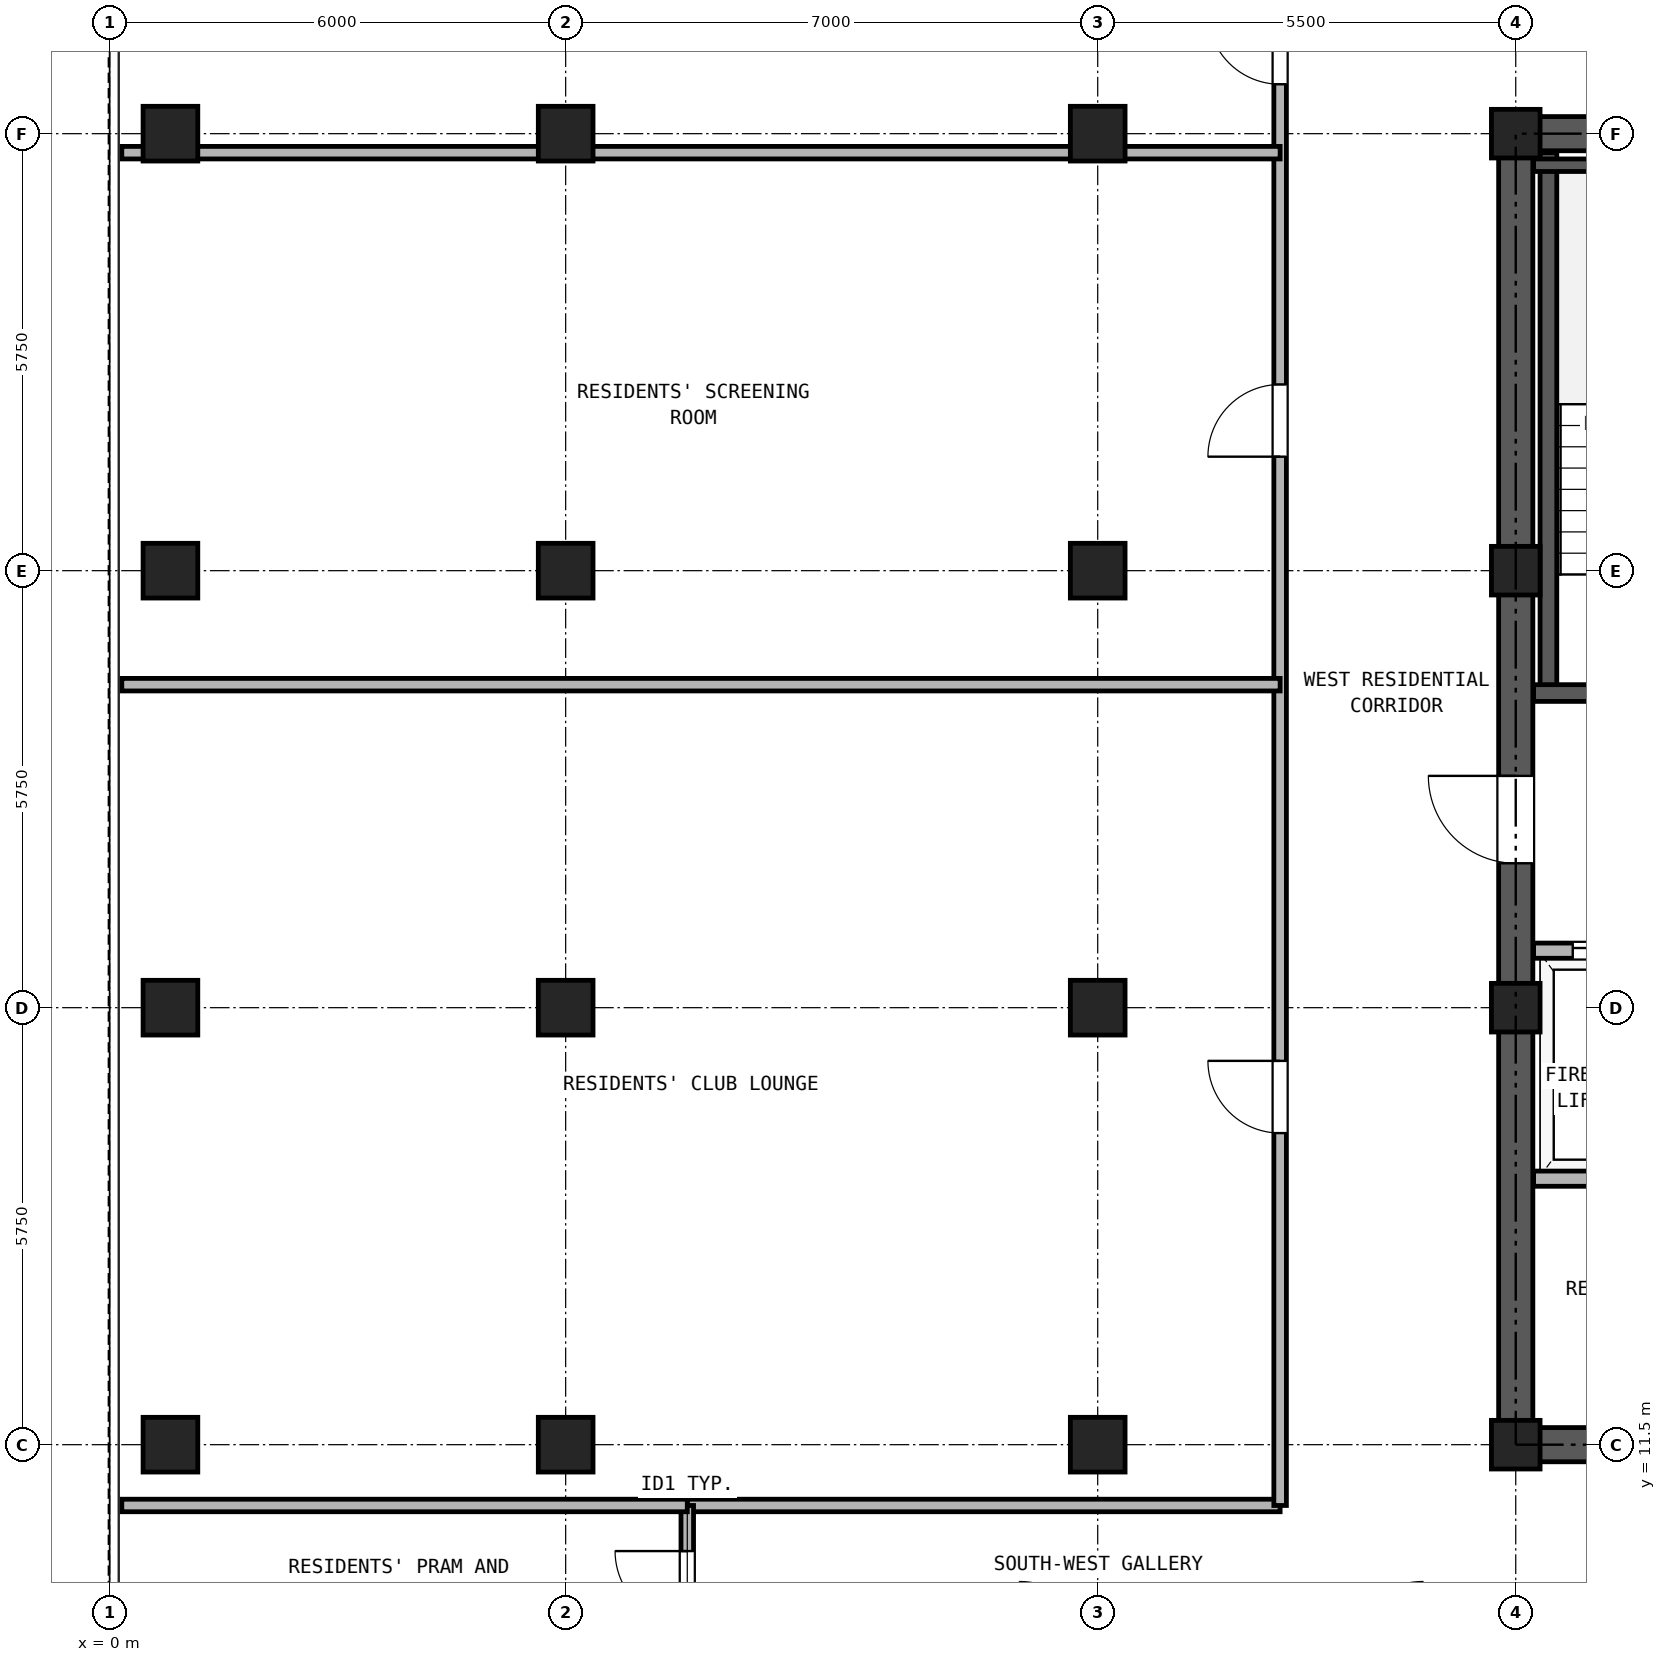
"""IFC4 building model, lengths in metres.
Left out: names, types, materials, properties, quantities, classifications, styles, units other than length and angle.
Written with IfcOpenShell. Run it as: python <this file> out.ifc"""

import sys

from ifc_helpers import new_model, si_unit, direction, frame, frame_2d, origin, origin_2d, place, context, subcontext, project, spatial, rectangle, hollow_rectangle, extrude, source, transform, mapped, element, fill, save


model = new_model("IFC4")
c1 = context("Model", 3, precision=1e-05, world=origin(), true_north=direction((0.0, 1.0)))
c2 = subcontext(c1, "Body", "Model", "MODEL_VIEW")
j1 = project(units=[si_unit("LENGTHUNIT", "METRE"), si_unit("PLANEANGLEUNIT", "RADIAN")], contexts=[c1])
p1 = place(None, origin())
s1 = spatial("IfcSite", under=j1, at=p1, CompositionType="ELEMENT")
p2 = place(p1, origin())
s2 = spatial("IfcBuilding", under=s1, at=p2, CompositionType="ELEMENT")
p3 = place(p2, frame((0.0, 0.0, 175.3)))
s3 = spatial("IfcBuildingStorey", under=s2, at=p3, CompositionType="ELEMENT", Elevation=175.3)
m1 = source(origin(), c2, "Body", "SweptSolid", [
    extrude(hollow_rectangle(XDim=0.72, YDim=0.72, WallThickness=0.04, at=origin_2d()), origin(), (0.0, 0.0, 1.0), 2.95),
])
for number, where, z_axis, x_axis in (
    (1, (0.8, 11.5, 0.0), (0.0, 0.0, 1.0), (1.0, 0.0, 0.0)),
    (2, (0.8, 17.25, 0.0), (0.0, 0.0, 1.0), (1.0, 0.0, 0.0)),
    (3, (0.8, 23.0, 0.0), (0.0, 0.0, 1.0), (1.0, 0.0, 0.0)),
    (4, (0.8, 28.75, 0.0), (0.0, 0.0, 1.0), (1.0, 0.0, 0.0)),
    (5, (6.0, 11.5, 0.0), (0.0, 0.0, 1.0), (1.0, 0.0, 0.0)),
    (6, (6.0, 17.25, 0.0), (0.0, 0.0, 1.0), (1.0, 0.0, 0.0)),
    (7, (6.0, 23.0, 0.0), (0.0, 0.0, 1.0), (1.0, 0.0, 0.0)),
    (8, (6.0, 28.75, 0.0), (0.0, 0.0, 1.0), (1.0, 0.0, 0.0)),
    (9, (13.0, 11.5, 0.0), (0.0, 0.0, 1.0), (1.0, 0.0, 0.0)),
    (10, (13.0, 17.25, 0.0), (0.0, 0.0, 1.0), (1.0, 0.0, 0.0)),
    (11, (13.0, 23.0, 0.0), (0.0, 0.0, 1.0), (1.0, 0.0, 0.0)),
    (12, (13.0, 28.75, 0.0), (0.0, 0.0, 1.0), (1.0, 0.0, 0.0)),
):
    element("IfcColumn", number, at=place(p3, frame(where, z_axis=z_axis, x_axis=x_axis)), inside=s3, PredefinedType="COLUMN", context=c2, shape_type="MappedRepresentation", body=[
        mapped(m1, transform((0.0, 0.0, 0.0), x_axis=(1.0, 0.0, 0.0), y_axis=(0.0, 1.0, 0.0), z_axis=(0.0, 0.0, 1.0), scale=1.0)),
    ])
m2 = source(origin(), c2, "Body", "SweptSolid", [
    extrude(hollow_rectangle(XDim=0.64, YDim=0.64, WallThickness=0.035, at=origin_2d()), origin(), (0.0, 0.0, 1.0), 2.95),
])
for number, where, z_axis, x_axis in (
    (13, (18.5, 11.5, 0.0), (0.0, 0.0, 1.0), (1.0, 0.0, 0.0)),
    (14, (18.5, 17.25, 0.0), (0.0, 0.0, 1.0), (1.0, 0.0, 0.0)),
    (15, (18.5, 23.0, 0.0), (0.0, 0.0, 1.0), (1.0, 0.0, 0.0)),
    (16, (18.5, 28.75, 0.0), (0.0, 0.0, 1.0), (1.0, 0.0, 0.0)),
):
    element("IfcColumn", number, at=place(p3, frame(where, z_axis=z_axis, x_axis=x_axis)), inside=s3, PredefinedType="COLUMN", context=c2, shape_type="MappedRepresentation", body=[
        mapped(m2, transform((0.0, 0.0, 0.0), x_axis=(1.0, 0.0, 0.0), y_axis=(0.0, 1.0, 0.0), z_axis=(0.0, 0.0, 1.0), scale=1.0)),
    ])
p4 = place(p3, frame((18.275, 11.5, 0.0), z_axis=(0.0, 0.0, 1.0), x_axis=(1.0, 0.0, 0.0)))
e17 = element("IfcWall", 17, at=p4, inside=s3, PredefinedType="SHEAR", context=c2, shape_type="SweptSolid", body=[
    extrude(rectangle(XDim=10.45, YDim=0.45, at=frame_2d((5.225, 0.0))), origin(), (0.0, 0.0, 1.0), 2.95),
])
p5 = place(p4, frame((1.825, 0.0, 0.0)))
e18 = element("IfcOpeningElement", 18, at=p5, cuts=e17, PredefinedType="OPENING", context=c2, shape_type="SweptSolid", body=[
    extrude(rectangle(XDim=0.95, YDim=2.15, at=frame_2d((0.475, 1.075))), frame((0.0, 0.235, 0.0), z_axis=(0.0, -1.0, 0.0), x_axis=(1.0, 0.0, 0.0)), (0.0, 0.0, 1.0), 0.47),
])
p6 = place(p4, frame((5.325, 0.0, 0.0)))
e19 = element("IfcOpeningElement", 19, at=p6, cuts=e17, PredefinedType="OPENING", context=c2, shape_type="SweptSolid", body=[
    extrude(rectangle(XDim=0.95, YDim=2.15, at=frame_2d((0.475, 1.075))), frame((0.0, 0.235, 0.0), z_axis=(0.0, -1.0, 0.0), x_axis=(1.0, 0.0, 0.0)), (0.0, 0.0, 1.0), 0.47),
])
p7 = place(p4, frame((8.225, 0.0, 0.0)))
e20 = element("IfcOpeningElement", 20, at=p7, cuts=e17, PredefinedType="OPENING", context=c2, shape_type="SweptSolid", body=[
    extrude(rectangle(XDim=1.1, YDim=2.25, at=frame_2d((0.55, 1.125))), frame((0.0, 0.235, 0.0), z_axis=(0.0, -1.0, 0.0), x_axis=(1.0, 0.0, 0.0)), (0.0, 0.0, 1.0), 0.47),
])
p8 = place(p3, frame((18.275, 28.75, 0.0), z_axis=(0.0, 0.0, 1.0), x_axis=(1.0, 0.0, 0.0)))
e21 = element("IfcWall", 21, at=p8, inside=s3, PredefinedType="SHEAR", context=c2, shape_type="SweptSolid", body=[
    extrude(rectangle(XDim=10.45, YDim=0.45, at=frame_2d((5.225, 0.0))), origin(), (0.0, 0.0, 1.0), 2.95),
])
p9 = place(p8, frame((4.105, 0.0, 0.0)))
e22 = element("IfcOpeningElement", 22, at=p9, cuts=e21, PredefinedType="OPENING", context=c2, shape_type="SweptSolid", body=[
    extrude(rectangle(XDim=0.9, YDim=2.05, at=frame_2d((0.45, 1.025))), frame((0.0, 0.235, 0.0), z_axis=(0.0, -1.0, 0.0), x_axis=(1.0, 0.0, 0.0)), (0.0, 0.0, 1.0), 0.47),
])
p10 = place(p8, frame((5.645, 0.0, 0.0)))
e23 = element("IfcOpeningElement", 23, at=p10, cuts=e21, PredefinedType="OPENING", context=c2, shape_type="SweptSolid", body=[
    extrude(rectangle(XDim=0.9, YDim=2.05, at=frame_2d((0.45, 1.025))), frame((0.0, 0.235, 0.0), z_axis=(0.0, -1.0, 0.0), x_axis=(1.0, 0.0, 0.0)), (0.0, 0.0, 1.0), 0.47),
])
p11 = place(p3, frame((18.5, 11.725, 0.0), z_axis=(0.0, 0.0, 1.0), x_axis=(0.0, 1.0, 0.0)))
e24 = element("IfcWall", 24, at=p11, inside=s3, PredefinedType="SHEAR", context=c2, shape_type="SweptSolid", body=[
    extrude(rectangle(XDim=16.8, YDim=0.45, at=frame_2d((8.4, 0.0))), origin(), (0.0, 0.0, 1.0), 2.95),
])
p12 = place(p11, frame((7.425, 0.0, 0.0)))
e25 = element("IfcOpeningElement", 25, at=p12, cuts=e24, PredefinedType="OPENING", context=c2, shape_type="SweptSolid", body=[
    extrude(rectangle(XDim=1.15, YDim=2.2, at=frame_2d((0.575, 1.1))), frame((0.0, 0.235, 0.0), z_axis=(0.0, -1.0, 0.0), x_axis=(1.0, 0.0, 0.0)), (0.0, 0.0, 1.0), 0.47),
])
p13 = place(p3, frame((18.93, 21.39, 0.0), z_axis=(0.0, 0.0, 1.0), x_axis=(0.0, 1.0, 0.0)))
e26 = element("IfcWall", 26, at=p13, inside=s3, PredefinedType="SOLIDWALL", context=c2, shape_type="SweptSolid", body=[
    extrude(rectangle(XDim=7.11, YDim=0.22, at=frame_2d((3.555, 0.0))), origin(), (0.0, 0.0, 1.0), 2.95),
])
p14 = place(p3, frame((18.735, 28.335, 0.0), z_axis=(0.0, 0.0, 1.0), x_axis=(1.0, 0.0, 0.0)))
e27 = element("IfcWall", 27, at=p14, inside=s3, PredefinedType="PARTITIONING", context=c2, shape_type="SweptSolid", body=[
    extrude(rectangle(XDim=3.375, YDim=0.165, at=frame_2d((1.688, 0.0))), origin(), (0.0, 0.0, 1.0), 2.95),
])
p15 = place(p3, frame((18.735, 21.39, 0.0), z_axis=(0.0, 0.0, 1.0), x_axis=(1.0, 0.0, 0.0)))
e28 = element("IfcWall", 28, at=p15, inside=s3, PredefinedType="SOLIDWALL", context=c2, shape_type="SweptSolid", body=[
    extrude(rectangle(XDim=6.395, YDim=0.22, at=frame_2d((3.197, 0.0))), origin(), (0.0, 0.0, 1.0), 2.95),
])
p16 = place(p15, frame((1.115, 0.0, 0.0)))
e29 = element("IfcOpeningElement", 29, at=p16, cuts=e28, PredefinedType="OPENING", context=c2, shape_type="SweptSolid", body=[
    extrude(rectangle(XDim=1.15, YDim=2.2, at=frame_2d((0.575, 1.1))), frame((0.0, 0.12, 0.0), z_axis=(0.0, -1.0, 0.0), x_axis=(1.0, 0.0, 0.0)), (0.0, 0.0, 1.0), 0.24),
])
p17 = place(p15, frame((4.845, 0.0, 0.0)))
e30 = element("IfcOpeningElement", 30, at=p17, cuts=e28, PredefinedType="OPENING", context=c2, shape_type="SweptSolid", body=[
    extrude(rectangle(XDim=1.1, YDim=2.25, at=frame_2d((0.55, 1.125))), frame((0.0, 0.12, 0.0), z_axis=(0.0, -1.0, 0.0), x_axis=(1.0, 0.0, 0.0)), (0.0, 0.0, 1.0), 0.24),
])
p18 = place(p3, frame((18.735, 18.0, 0.0), z_axis=(0.0, 0.0, 1.0), x_axis=(1.0, 0.0, 0.0)))
e31 = element("IfcWall", 31, at=p18, inside=s3, PredefinedType="PARTITIONING", context=c2, shape_type="SweptSolid", body=[
    extrude(rectangle(XDim=9.53, YDim=0.2, at=frame_2d((4.765, 0.0))), origin(), (0.0, 0.0, 1.0), 2.95),
])
p19 = place(p18, frame((0.515, 0.0, 0.0)))
e32 = element("IfcOpeningElement", 32, at=p19, cuts=e31, PredefinedType="OPENING", context=c2, shape_type="SweptSolid", body=[
    extrude(rectangle(XDim=1.3, YDim=2.3, at=frame_2d((0.65, 1.15))), frame((0.0, 0.11, 0.0), z_axis=(0.0, -1.0, 0.0), x_axis=(1.0, 0.0, 0.0)), (0.0, 0.0, 1.0), 0.22),
])
p20 = place(p18, frame((2.615, 0.0, 0.0)))
e33 = element("IfcOpeningElement", 33, at=p20, cuts=e31, PredefinedType="OPENING", context=c2, shape_type="SweptSolid", body=[
    extrude(rectangle(XDim=1.3, YDim=2.3, at=frame_2d((0.65, 1.15))), frame((0.0, 0.11, 0.0), z_axis=(0.0, -1.0, 0.0), x_axis=(1.0, 0.0, 0.0)), (0.0, 0.0, 1.0), 0.22),
])
p21 = place(p18, frame((5.015, 0.0, 0.0)))
e34 = element("IfcOpeningElement", 34, at=p21, cuts=e31, PredefinedType="OPENING", context=c2, shape_type="SweptSolid", body=[
    extrude(rectangle(XDim=0.9, YDim=2.05, at=frame_2d((0.45, 1.025))), frame((0.0, 0.11, 0.0), z_axis=(0.0, -1.0, 0.0), x_axis=(1.0, 0.0, 0.0)), (0.0, 0.0, 1.0), 0.22),
])
p22 = place(p18, frame((7.715, 0.0, 0.0)))
e35 = element("IfcOpeningElement", 35, at=p22, cuts=e31, PredefinedType="OPENING", context=c2, shape_type="SweptSolid", body=[
    extrude(rectangle(XDim=0.9, YDim=2.05, at=frame_2d((0.45, 1.025))), frame((0.0, 0.11, 0.0), z_axis=(0.0, -1.0, 0.0), x_axis=(1.0, 0.0, 0.0)), (0.0, 0.0, 1.0), 0.22),
])
p23 = place(p3, frame((18.735, 15.0, 0.0), z_axis=(0.0, 0.0, 1.0), x_axis=(1.0, 0.0, 0.0)))
e36 = element("IfcWall", 36, at=p23, inside=s3, PredefinedType="PARTITIONING", context=c2, shape_type="SweptSolid", body=[
    extrude(rectangle(XDim=9.53, YDim=0.2, at=frame_2d((4.765, 0.0))), origin(), (0.0, 0.0, 1.0), 2.95),
])
p24 = place(p3, frame((7.6, 10.7, 0.0), z_axis=(0.0, 0.0, 1.0), x_axis=(1.0, 0.0, 0.0)))
e37 = element("IfcWall", 37, at=p24, inside=s3, PredefinedType="PARTITIONING", context=c2, shape_type="SweptSolid", body=[
    extrude(rectangle(XDim=7.8, YDim=0.165, at=frame_2d((3.9, 0.0))), origin(), (0.0, 0.0, 1.0), 2.95),
])
p25 = place(p3, frame((7.6, 8.7, 0.0), z_axis=(0.0, 0.0, 1.0), x_axis=(0.0, 1.0, 0.0)))
e38 = element("IfcWall", 38, at=p25, inside=s3, PredefinedType="PARTITIONING", context=c2, shape_type="SweptSolid", body=[
    extrude(rectangle(XDim=2.0, YDim=0.165, at=frame_2d((1.0, 0.0))), origin(), (0.0, 0.0, 1.0), 2.95),
])
p26 = place(p25, frame((0.45, 0.0, 0.0)))
e39 = element("IfcOpeningElement", 39, at=p26, cuts=e38, PredefinedType="OPENING", context=c2, shape_type="SweptSolid", body=[
    extrude(rectangle(XDim=0.95, YDim=2.15, at=frame_2d((0.475, 1.075))), frame((0.0, 0.093, 0.0), z_axis=(0.0, -1.0, 0.0), x_axis=(1.0, 0.0, 0.0)), (0.0, 0.0, 1.0), 0.185),
])
p27 = place(p3, frame((15.4, 10.7, 0.0), z_axis=(0.0, 0.0, 1.0), x_axis=(0.0, 1.0, 0.0)))
e40 = element("IfcWall", 40, at=p27, inside=s3, PredefinedType="PARTITIONING", context=c2, shape_type="SweptSolid", body=[
    extrude(rectangle(XDim=24.44, YDim=0.165, at=frame_2d((12.22, 0.0))), origin(), (0.0, 0.0, 1.0), 2.95),
])
p28 = place(p27, frame((4.9, 0.0, 0.0)))
e41 = element("IfcOpeningElement", 41, at=p28, cuts=e40, PredefinedType="OPENING", context=c2, shape_type="SweptSolid", body=[
    extrude(rectangle(XDim=0.95, YDim=2.15, at=frame_2d((0.475, 1.075))), frame((0.0, 0.093, 0.0), z_axis=(0.0, -1.0, 0.0), x_axis=(1.0, 0.0, 0.0)), (0.0, 0.0, 1.0), 0.185),
])
p29 = place(p27, frame((13.8, 0.0, 0.0)))
e42 = element("IfcOpeningElement", 42, at=p29, cuts=e40, PredefinedType="OPENING", context=c2, shape_type="SweptSolid", body=[
    extrude(rectangle(XDim=0.95, YDim=2.15, at=frame_2d((0.475, 1.075))), frame((0.0, 0.093, 0.0), z_axis=(0.0, -1.0, 0.0), x_axis=(1.0, 0.0, 0.0)), (0.0, 0.0, 1.0), 0.185),
])
p30 = place(p27, frame((18.7, 0.0, 0.0)))
e43 = element("IfcOpeningElement", 43, at=p30, cuts=e40, PredefinedType="OPENING", context=c2, shape_type="SweptSolid", body=[
    extrude(rectangle(XDim=0.95, YDim=2.15, at=frame_2d((0.475, 1.075))), frame((0.0, 0.093, 0.0), z_axis=(0.0, -1.0, 0.0), x_axis=(1.0, 0.0, 0.0)), (0.0, 0.0, 1.0), 0.185),
])
p31 = place(p3, frame((0.16, 10.7, 0.0), z_axis=(0.0, 0.0, 1.0), x_axis=(1.0, 0.0, 0.0)))
e44 = element("IfcWall", 44, at=p31, inside=s3, PredefinedType="PARTITIONING", context=c2, shape_type="SweptSolid", body=[
    extrude(rectangle(XDim=7.44, YDim=0.165, at=frame_2d((3.72, 0.0))), origin(), (0.0, 0.0, 1.0), 2.95),
])
p32 = place(p3, frame((0.16, 21.5, 0.0), z_axis=(0.0, 0.0, 1.0), x_axis=(1.0, 0.0, 0.0)))
e45 = element("IfcWall", 45, at=p32, inside=s3, PredefinedType="PARTITIONING", context=c2, shape_type="SweptSolid", body=[
    extrude(rectangle(XDim=15.24, YDim=0.165, at=frame_2d((7.62, 0.0))), origin(), (0.0, 0.0, 1.0), 2.95),
])
p33 = place(p3, frame((0.16, 28.5, 0.0), z_axis=(0.0, 0.0, 1.0), x_axis=(1.0, 0.0, 0.0)))
e46 = element("IfcWall", 46, at=p33, inside=s3, PredefinedType="PARTITIONING", context=c2, shape_type="SweptSolid", body=[
    extrude(rectangle(XDim=15.24, YDim=0.165, at=frame_2d((7.62, 0.0))), origin(), (0.0, 0.0, 1.0), 2.323),
])
p34 = place(p19, origin())
e47 = element("IfcDoor", 47, at=p34, inside=s3, OperationType="DOUBLE_DOOR_SLIDING", PredefinedType="DOOR", context=c2, shape_type="SweptSolid", body=[
    extrude(rectangle(XDim=1.3, YDim=2.3, at=frame_2d((0.65, 1.15))), frame((0.0, 0.025, 0.0), z_axis=(0.0, -1.0, 0.0), x_axis=(1.0, 0.0, 0.0)), (0.0, 0.0, 1.0), 0.05),
])
fill(e32, e47)
p35 = place(p12, frame((1.15, 0.0, 0.0), z_axis=(0.0, 0.0, 1.0), x_axis=(-1.0, 0.0, 0.0)))
e48 = element("IfcDoor", 48, at=p35, inside=s3, OperationType="SINGLE_SWING_RIGHT", PredefinedType="DOOR", context=c2, shape_type="SweptSolid", body=[
    extrude(rectangle(XDim=1.15, YDim=2.2, at=frame_2d((0.575, 1.1))), frame((0.0, 0.025, 0.0), z_axis=(0.0, -1.0, 0.0), x_axis=(1.0, 0.0, 0.0)), (0.0, 0.0, 1.0), 0.05),
])
fill(e25, e48)
p36 = place(p26, frame((0.95, 0.0, 0.0), z_axis=(0.0, 0.0, 1.0), x_axis=(-1.0, 0.0, 0.0)))
e49 = element("IfcDoor", 49, at=p36, inside=s3, OperationType="SINGLE_SWING_RIGHT", PredefinedType="DOOR", context=c2, shape_type="SweptSolid", body=[
    extrude(rectangle(XDim=0.95, YDim=2.15, at=frame_2d((0.475, 1.075))), frame((0.0, 0.025, 0.0), z_axis=(0.0, -1.0, 0.0), x_axis=(1.0, 0.0, 0.0)), (0.0, 0.0, 1.0), 0.05),
])
fill(e39, e49)
p37 = place(p28, frame((0.95, 0.0, 0.0), z_axis=(0.0, 0.0, 1.0), x_axis=(-1.0, 0.0, 0.0)))
e50 = element("IfcDoor", 50, at=p37, inside=s3, OperationType="SINGLE_SWING_RIGHT", PredefinedType="DOOR", context=c2, shape_type="SweptSolid", body=[
    extrude(rectangle(XDim=0.95, YDim=2.15, at=frame_2d((0.475, 1.075))), frame((0.0, 0.025, 0.0), z_axis=(0.0, -1.0, 0.0), x_axis=(1.0, 0.0, 0.0)), (0.0, 0.0, 1.0), 0.05),
])
fill(e41, e50)
p38 = place(p29, frame((0.95, 0.0, 0.0), z_axis=(0.0, 0.0, 1.0), x_axis=(-1.0, 0.0, 0.0)))
e51 = element("IfcDoor", 51, at=p38, inside=s3, OperationType="SINGLE_SWING_LEFT", PredefinedType="DOOR", context=c2, shape_type="SweptSolid", body=[
    extrude(rectangle(XDim=0.95, YDim=2.15, at=frame_2d((0.475, 1.075))), frame((0.0, 0.025, 0.0), z_axis=(0.0, -1.0, 0.0), x_axis=(1.0, 0.0, 0.0)), (0.0, 0.0, 1.0), 0.05),
])
fill(e42, e51)
p39 = place(p30, frame((0.95, 0.0, 0.0), z_axis=(0.0, 0.0, 1.0), x_axis=(-1.0, 0.0, 0.0)))
e52 = element("IfcDoor", 52, at=p39, inside=s3, OperationType="SINGLE_SWING_RIGHT", PredefinedType="DOOR", context=c2, shape_type="SweptSolid", body=[
    extrude(rectangle(XDim=0.95, YDim=2.15, at=frame_2d((0.475, 1.075))), frame((0.0, 0.025, 0.0), z_axis=(0.0, -1.0, 0.0), x_axis=(1.0, 0.0, 0.0)), (0.0, 0.0, 1.0), 0.05),
])
fill(e43, e52)
save(model, sys.argv[1])
